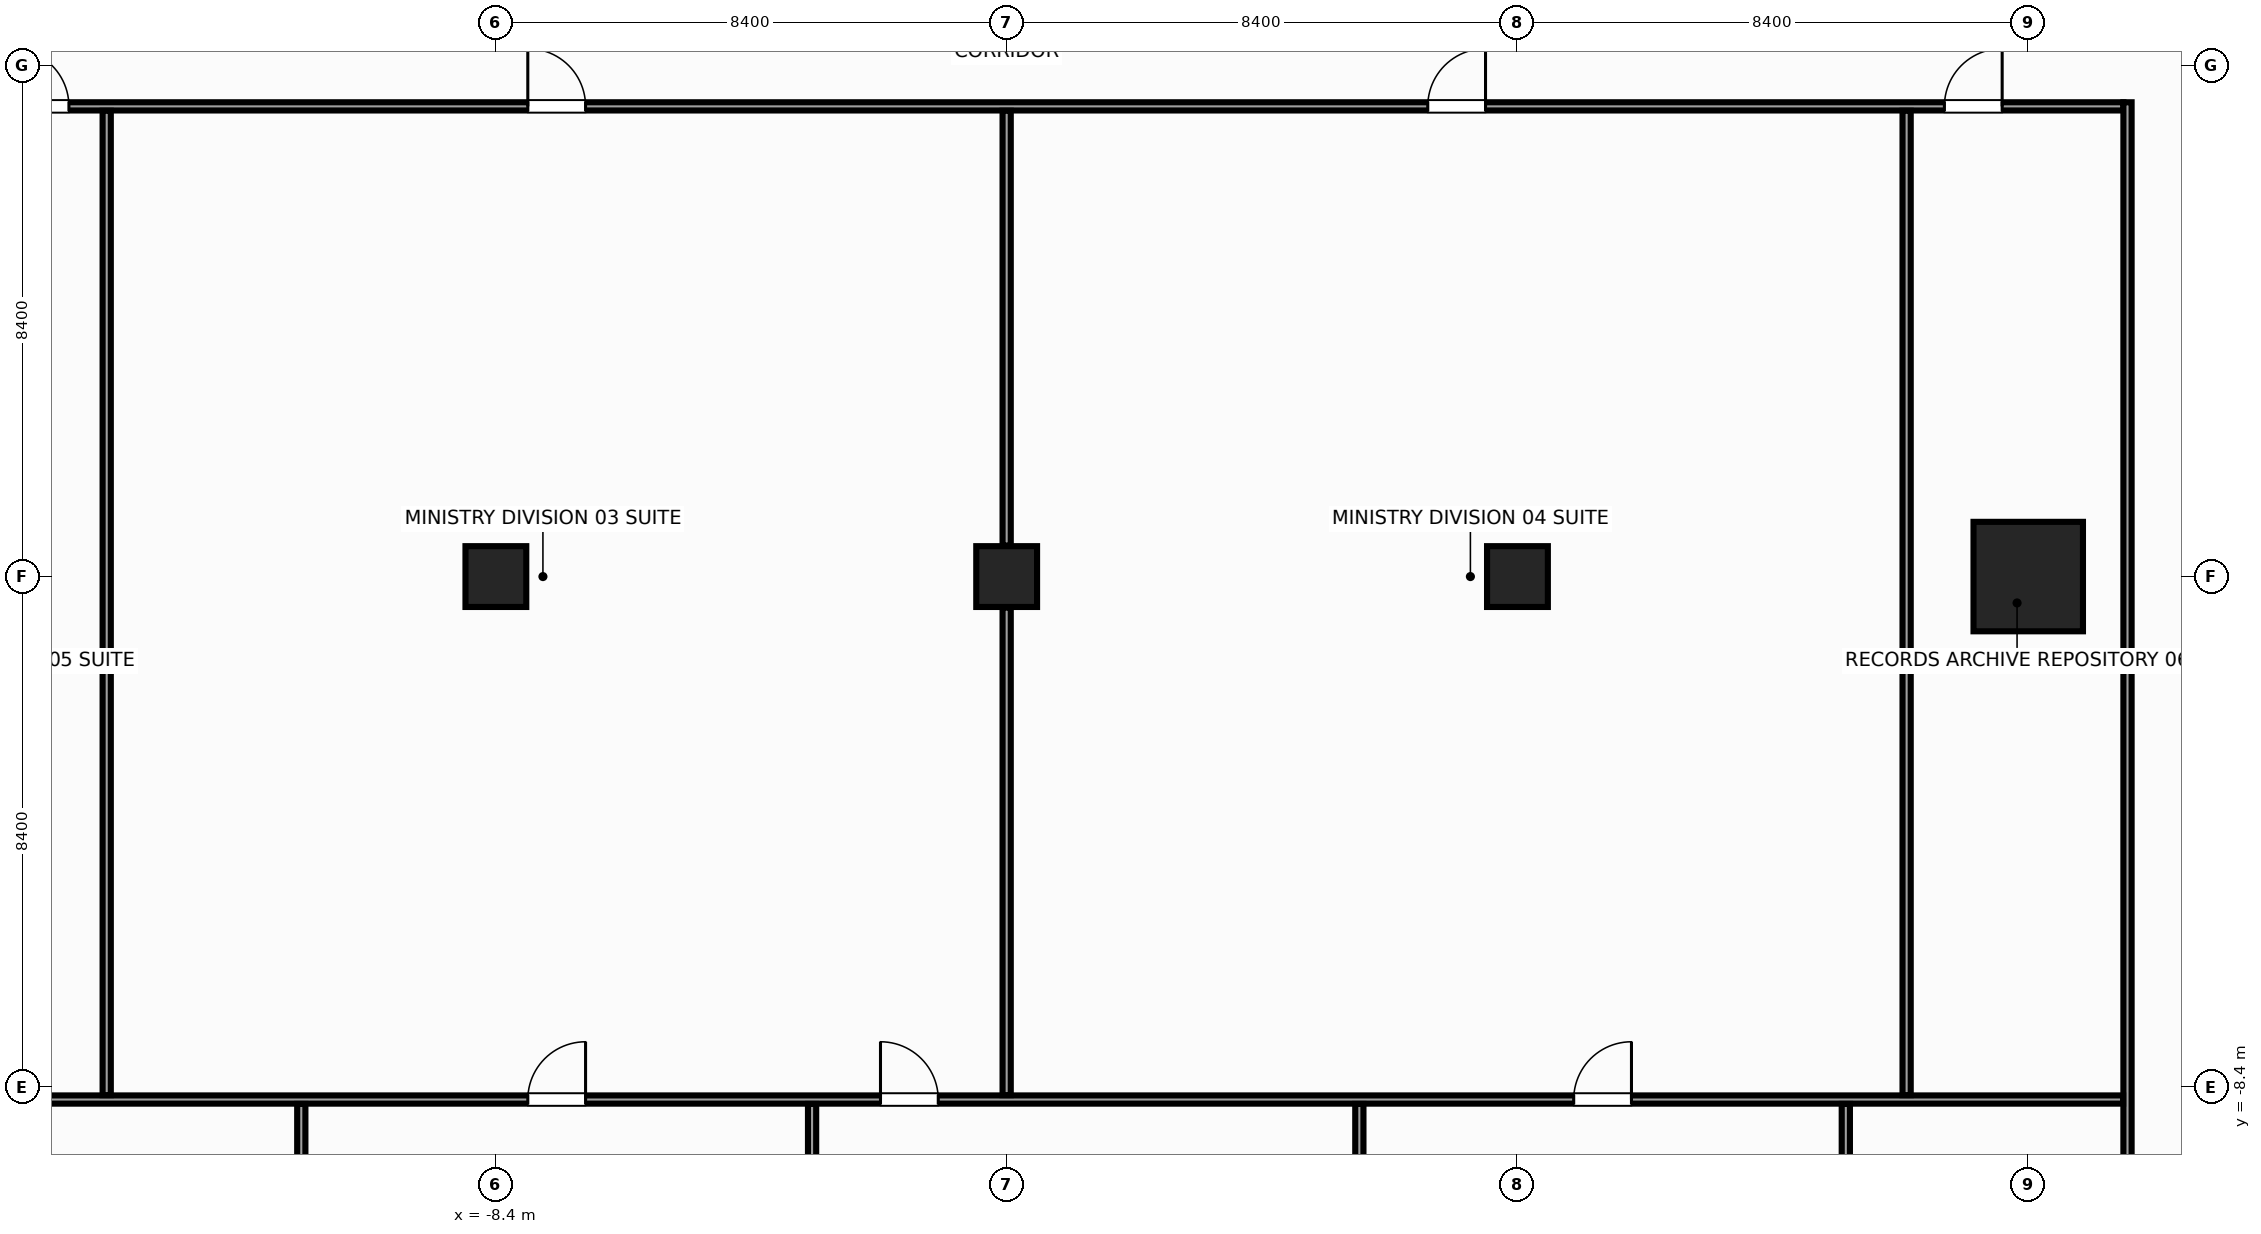
"""IFC4 building model, lengths in metres.
Left out: names, types, materials, properties, quantities, classifications, styles, units other than length and angle.
Written with IfcOpenShell. Run it as: python <this file> out.ifc"""

import sys

from ifc_helpers import new_model, si_unit, direction, frame, frame_2d, origin, origin_with_axes, origin_2d, place, context, subcontext, project, spatial, rectangle, hollow_rectangle, extrude, source, transform, mapped, element, fill, save


model = new_model("IFC4")
c1 = context("Model", 3, precision=1e-05, world=origin(), true_north=direction((0.0, 1.0)))
c2 = subcontext(c1, "Body", "Model", "MODEL_VIEW")
j1 = project(units=[si_unit("LENGTHUNIT", "METRE"), si_unit("PLANEANGLEUNIT", "RADIAN")], contexts=[c1])
p1 = place(None, origin())
s1 = spatial("IfcSite", under=j1, at=p1, CompositionType="ELEMENT")
p2 = place(p1, origin())
s2 = spatial("IfcBuilding", under=s1, at=p2, CompositionType="ELEMENT")
p3 = place(p2, frame((0.0, 0.0, 38.0)))
s3 = spatial("IfcBuildingStorey", under=s2, at=p3, CompositionType="ELEMENT", Elevation=38.0)
m1 = source(origin(), c2, "Body", "SweptSolid", [
    extrude(rectangle(XDim=1.8, YDim=1.8, at=origin_2d()), origin(), (0.0, 0.0, 1.0), 3.6),
])
p4 = place(p3, frame((16.8, 0.0, 0.0), z_axis=(0.0, 0.0, 1.0), x_axis=(1.0, 0.0, 0.0)))
e1 = element("IfcColumn", 1, at=p4, inside=s3, PredefinedType="COLUMN", context=c2, shape_type="MappedRepresentation", body=[
    mapped(m1, transform((0.0, 0.0, 0.0), x_axis=(1.0, 0.0, 0.0), y_axis=(0.0, 1.0, 0.0), z_axis=(0.0, 0.0, 1.0), scale=1.0)),
])
m2 = source(origin(), c2, "Body", "SweptSolid", [
    extrude(hollow_rectangle(XDim=1.0, YDim=1.0, WallThickness=0.045, at=origin_2d()), origin(), (0.0, 0.0, 1.0), 3.6),
])
for number, where, z_axis, x_axis in (
    (2, (-8.4, 0.0, 0.0), (0.0, 0.0, 1.0), (1.0, 0.0, 0.0)),
    (3, (8.4, 0.0, 0.0), (0.0, 0.0, 1.0), (1.0, 0.0, 0.0)),
):
    element("IfcColumn", number, at=place(p3, frame(where, z_axis=z_axis, x_axis=x_axis)), inside=s3, PredefinedType="COLUMN", context=c2, shape_type="MappedRepresentation", body=[
        mapped(m2, transform((0.0, 0.0, 0.0), x_axis=(1.0, 0.0, 0.0), y_axis=(0.0, 1.0, 0.0), z_axis=(0.0, 0.0, 1.0), scale=1.0)),
    ])
m3 = source(origin(), c2, "Body", "SweptSolid", [
    extrude(rectangle(XDim=1.0, YDim=1.0, at=origin_2d()), origin(), (0.0, 0.0, 1.0), 3.6),
])
p5 = place(p3, origin_with_axes())
e4 = element("IfcColumn", 4, at=p5, inside=s3, PredefinedType="COLUMN", context=c2, shape_type="MappedRepresentation", body=[
    mapped(m3, transform((0.0, 0.0, 0.0), x_axis=(1.0, 0.0, 0.0), y_axis=(0.0, 1.0, 0.0), z_axis=(0.0, 0.0, 1.0), scale=1.0)),
])
m4 = source(origin(), c2, "Body", "SweptSolid", [
    extrude(rectangle(XDim=36.73, YDim=0.135, at=frame_2d((18.365, 0.0))), origin(), (0.0, 0.0, 1.0), 2.745),
])
p6 = place(p3, frame((-18.365, 7.732, 0.0), z_axis=(0.0, 0.0, 1.0), x_axis=(1.0, 0.0, 0.0)))
e5 = element("IfcWall", 5, at=p6, inside=s3, PredefinedType="PARTITIONING", context=c2, shape_type="MappedRepresentation", body=[
    mapped(m4, transform((0.0, 0.0, 0.0), x_axis=(1.0, 0.0, 0.0), y_axis=(0.0, 1.0, 0.0), z_axis=(0.0, 0.0, 1.0), scale=1.0)),
])
p7 = place(p6, frame((10.49, 0.0, 0.0)))
e6 = element("IfcOpeningElement", 6, at=p7, cuts=e5, PredefinedType="OPENING", context=c2, shape_type="SweptSolid", body=[
    extrude(rectangle(XDim=0.95, YDim=2.15, at=frame_2d((0.475, 1.075))), frame((0.0, 0.08, 0.0), z_axis=(0.0, -1.0, 0.0), x_axis=(1.0, 0.0, 0.0)), (0.0, 0.0, 1.0), 0.159),
])
p8 = place(p6, frame((25.29, 0.0, 0.0)))
e7 = element("IfcOpeningElement", 7, at=p8, cuts=e5, PredefinedType="OPENING", context=c2, shape_type="SweptSolid", body=[
    extrude(rectangle(XDim=0.95, YDim=2.15, at=frame_2d((0.475, 1.075))), frame((0.0, 0.08, 0.0), z_axis=(0.0, -1.0, 0.0), x_axis=(1.0, 0.0, 0.0)), (0.0, 0.0, 1.0), 0.159),
])
p9 = place(p6, frame((1.994, 0.0, 0.0)))
e8 = element("IfcOpeningElement", 8, at=p9, cuts=e5, PredefinedType="OPENING", context=c2, shape_type="SweptSolid", body=[
    extrude(rectangle(XDim=0.95, YDim=2.15, at=frame_2d((0.475, 1.075))), frame((0.0, 0.08, 0.0), z_axis=(0.0, -1.0, 0.0), x_axis=(1.0, 0.0, 0.0)), (0.0, 0.0, 1.0), 0.159),
])
p10 = place(p6, frame((33.786, 0.0, 0.0)))
e9 = element("IfcOpeningElement", 9, at=p10, cuts=e5, PredefinedType="OPENING", context=c2, shape_type="SweptSolid", body=[
    extrude(rectangle(XDim=0.95, YDim=2.15, at=frame_2d((0.475, 1.075))), frame((0.0, 0.08, 0.0), z_axis=(0.0, -1.0, 0.0), x_axis=(1.0, 0.0, 0.0)), (0.0, 0.0, 1.0), 0.159),
])
m5 = source(origin(), c2, "Body", "SweptSolid", [
    extrude(rectangle(XDim=21.995, YDim=0.135, at=frame_2d((10.998, 0.0))), origin(), (0.0, 0.0, 1.0), 2.745),
])
p11 = place(p3, frame((18.433, -14.195, 0.0), z_axis=(0.0, 0.0, 1.0), x_axis=(0.0, 1.0, 0.0)))
e10 = element("IfcWall", 10, at=p11, inside=s3, PredefinedType="PARTITIONING", context=c2, shape_type="MappedRepresentation", body=[
    mapped(m5, transform((0.0, 0.0, 0.0), x_axis=(1.0, 0.0, 0.0), y_axis=(0.0, 1.0, 0.0), z_axis=(0.0, 0.0, 1.0), scale=1.0)),
])
p12 = place(p11, frame((0.809, 0.0, 0.0)))
e11 = element("IfcOpeningElement", 11, at=p12, cuts=e10, PredefinedType="OPENING", context=c2, shape_type="SweptSolid", body=[
    extrude(rectangle(XDim=0.95, YDim=2.15, at=frame_2d((0.475, 1.075))), frame((0.0, 0.08, 0.0), z_axis=(0.0, -1.0, 0.0), x_axis=(1.0, 0.0, 0.0)), (0.0, 0.0, 1.0), 0.159),
])
m6 = source(origin(), c2, "Body", "SweptSolid", [
    extrude(rectangle(XDim=36.72, YDim=0.135, at=frame_2d((18.36, 0.0))), origin(), (0.0, 0.0, 1.0), 2.745),
])
p13 = place(p3, frame((-18.36, -8.6, 0.0), z_axis=(0.0, 0.0, 1.0), x_axis=(1.0, 0.0, 0.0)))
e12 = element("IfcWall", 12, at=p13, inside=s3, PredefinedType="PARTITIONING", context=c2, shape_type="MappedRepresentation", body=[
    mapped(m6, transform((0.0, 0.0, 0.0), x_axis=(1.0, 0.0, 0.0), y_axis=(0.0, 1.0, 0.0), z_axis=(0.0, 0.0, 1.0), scale=1.0)),
])
p14 = place(p13, frame((10.485, 0.0, 0.0)))
e13 = element("IfcOpeningElement", 13, at=p14, cuts=e12, PredefinedType="OPENING", context=c2, shape_type="SweptSolid", body=[
    extrude(rectangle(XDim=0.95, YDim=2.15, at=frame_2d((0.475, 1.075))), frame((0.0, 0.08, 0.0), z_axis=(0.0, -1.0, 0.0), x_axis=(1.0, 0.0, 0.0)), (0.0, 0.0, 1.0), 0.159),
])
p15 = place(p13, frame((16.285, 0.0, 0.0)))
e14 = element("IfcOpeningElement", 14, at=p15, cuts=e12, PredefinedType="OPENING", context=c2, shape_type="SweptSolid", body=[
    extrude(rectangle(XDim=0.95, YDim=2.15, at=frame_2d((0.475, 1.075))), frame((0.0, 0.08, 0.0), z_axis=(0.0, -1.0, 0.0), x_axis=(1.0, 0.0, 0.0)), (0.0, 0.0, 1.0), 0.159),
])
p16 = place(p13, frame((27.685, 0.0, 0.0)))
e15 = element("IfcOpeningElement", 15, at=p16, cuts=e12, PredefinedType="OPENING", context=c2, shape_type="SweptSolid", body=[
    extrude(rectangle(XDim=0.95, YDim=2.15, at=frame_2d((0.475, 1.075))), frame((0.0, 0.08, 0.0), z_axis=(0.0, -1.0, 0.0), x_axis=(1.0, 0.0, 0.0)), (0.0, 0.0, 1.0), 0.159),
])
m7 = source(origin(), c2, "Body", "SweptSolid", [
    extrude(rectangle(XDim=16.188, YDim=0.135, at=frame_2d((8.094, 0.0))), origin(), (0.0, 0.0, 1.0), 2.37),
])
p17 = place(p3, frame((-14.8, -8.528, 0.0), z_axis=(0.0, 0.0, 1.0), x_axis=(0.0, 1.0, 0.0)))
e16 = element("IfcWall", 16, at=p17, inside=s3, PredefinedType="PARTITIONING", context=c2, shape_type="MappedRepresentation", body=[
    mapped(m7, transform((0.0, 0.0, 0.0), x_axis=(1.0, 0.0, 0.0), y_axis=(0.0, 1.0, 0.0), z_axis=(0.0, 0.0, 1.0), scale=1.0)),
])
m8 = source(origin(), c2, "Body", "SweptSolid", [
    extrude(rectangle(XDim=8.018, YDim=0.135, at=frame_2d((4.009, 0.0))), origin(), (0.0, 0.0, 1.0), 2.745),
])
p18 = place(p3, frame((0.0, -8.528, 0.0), z_axis=(0.0, 0.0, 1.0), x_axis=(0.0, 1.0, 0.0)))
e17 = element("IfcWall", 17, at=p18, inside=s3, PredefinedType="PARTITIONING", context=c2, shape_type="MappedRepresentation", body=[
    mapped(m8, transform((0.0, 0.0, 0.0), x_axis=(1.0, 0.0, 0.0), y_axis=(0.0, 1.0, 0.0), z_axis=(0.0, 0.0, 1.0), scale=1.0)),
])
m9 = source(origin(), c2, "Body", "SweptSolid", [
    extrude(rectangle(XDim=7.15, YDim=0.135, at=frame_2d((3.575, 0.0))), origin(), (0.0, 0.0, 1.0), 2.37),
])
p19 = place(p3, frame((0.0, 0.51, 0.0), z_axis=(0.0, 0.0, 1.0), x_axis=(0.0, 1.0, 0.0)))
e18 = element("IfcWall", 18, at=p19, inside=s3, PredefinedType="PARTITIONING", context=c2, shape_type="MappedRepresentation", body=[
    mapped(m9, transform((0.0, 0.0, 0.0), x_axis=(1.0, 0.0, 0.0), y_axis=(0.0, 1.0, 0.0), z_axis=(0.0, 0.0, 1.0), scale=1.0)),
])
p20 = place(p3, frame((14.8, -8.528, 0.0), z_axis=(0.0, 0.0, 1.0), x_axis=(0.0, 1.0, 0.0)))
e19 = element("IfcWall", 19, at=p20, inside=s3, PredefinedType="PARTITIONING", context=c2, shape_type="MappedRepresentation", body=[
    mapped(m7, transform((0.0, 0.0, 0.0), x_axis=(1.0, 0.0, 0.0), y_axis=(0.0, 1.0, 0.0), z_axis=(0.0, 0.0, 1.0), scale=1.0)),
])
m10 = source(origin(), c2, "Body", "SweptSolid", [
    extrude(rectangle(XDim=18.177, YDim=0.135, at=frame_2d((9.089, 0.0))), origin(), (0.0, 0.0, 1.0), 2.745),
])
for number, where, z_axis, x_axis in (
    (20, (-11.6, -26.85, 0.0), (0.0, 0.0, 1.0), (0.0, 1.0, 0.0)),
    (21, (-3.2, -26.85, 0.0), (0.0, 0.0, 1.0), (0.0, 1.0, 0.0)),
    (22, (5.8, -26.85, 0.0), (0.0, 0.0, 1.0), (0.0, 1.0, 0.0)),
    (23, (13.8, -26.85, 0.0), (0.0, 0.0, 1.0), (0.0, 1.0, 0.0)),
):
    element("IfcWall", number, at=place(p3, frame(where, z_axis=z_axis, x_axis=x_axis)), inside=s3, PredefinedType="PARTITIONING", context=c2, shape_type="MappedRepresentation", body=[
        mapped(m10, transform((0.0, 0.0, 0.0), x_axis=(1.0, 0.0, 0.0), y_axis=(0.0, 1.0, 0.0), z_axis=(0.0, 0.0, 1.0), scale=1.0)),
    ])
m11 = source(origin(), c2, "Body", "SweptSolid", [
    extrude(rectangle(XDim=0.95, YDim=2.15, at=frame_2d((0.475, 1.075))), frame((0.0, 0.025, 0.0), z_axis=(0.0, -1.0, 0.0), x_axis=(1.0, 0.0, 0.0)), (0.0, 0.0, 1.0), 0.05),
])
p21 = place(p7, origin())
e24 = element("IfcDoor", 24, at=p21, inside=s3, OperationType="SINGLE_SWING_LEFT", PredefinedType="DOOR", context=c2, shape_type="MappedRepresentation", body=[
    mapped(m11, transform((0.0, 0.0, 0.0), x_axis=(1.0, 0.0, 0.0), y_axis=(0.0, 1.0, 0.0), z_axis=(0.0, 0.0, 1.0), scale=1.0)),
])
fill(e6, e24)
p22 = place(p8, origin())
e25 = element("IfcDoor", 25, at=p22, inside=s3, OperationType="SINGLE_SWING_RIGHT", PredefinedType="DOOR", context=c2, shape_type="MappedRepresentation", body=[
    mapped(m11, transform((0.0, 0.0, 0.0), x_axis=(1.0, 0.0, 0.0), y_axis=(0.0, 1.0, 0.0), z_axis=(0.0, 0.0, 1.0), scale=1.0)),
])
fill(e7, e25)
p23 = place(p9, origin())
e26 = element("IfcDoor", 26, at=p23, inside=s3, OperationType="SINGLE_SWING_LEFT", PredefinedType="DOOR", context=c2, shape_type="MappedRepresentation", body=[
    mapped(m11, transform((0.0, 0.0, 0.0), x_axis=(1.0, 0.0, 0.0), y_axis=(0.0, 1.0, 0.0), z_axis=(0.0, 0.0, 1.0), scale=1.0)),
])
fill(e8, e26)
p24 = place(p10, origin())
e27 = element("IfcDoor", 27, at=p24, inside=s3, OperationType="SINGLE_SWING_RIGHT", PredefinedType="DOOR", context=c2, shape_type="MappedRepresentation", body=[
    mapped(m11, transform((0.0, 0.0, 0.0), x_axis=(1.0, 0.0, 0.0), y_axis=(0.0, 1.0, 0.0), z_axis=(0.0, 0.0, 1.0), scale=1.0)),
])
fill(e9, e27)
p25 = place(p14, origin())
e28 = element("IfcDoor", 28, at=p25, inside=s3, OperationType="SINGLE_SWING_RIGHT", PredefinedType="DOOR", context=c2, shape_type="MappedRepresentation", body=[
    mapped(m11, transform((0.0, 0.0, 0.0), x_axis=(1.0, 0.0, 0.0), y_axis=(0.0, 1.0, 0.0), z_axis=(0.0, 0.0, 1.0), scale=1.0)),
])
fill(e13, e28)
p26 = place(p15, origin())
e29 = element("IfcDoor", 29, at=p26, inside=s3, OperationType="SINGLE_SWING_LEFT", PredefinedType="DOOR", context=c2, shape_type="MappedRepresentation", body=[
    mapped(m11, transform((0.0, 0.0, 0.0), x_axis=(1.0, 0.0, 0.0), y_axis=(0.0, 1.0, 0.0), z_axis=(0.0, 0.0, 1.0), scale=1.0)),
])
fill(e14, e29)
p27 = place(p16, origin())
e30 = element("IfcDoor", 30, at=p27, inside=s3, OperationType="SINGLE_SWING_RIGHT", PredefinedType="DOOR", context=c2, shape_type="MappedRepresentation", body=[
    mapped(m11, transform((0.0, 0.0, 0.0), x_axis=(1.0, 0.0, 0.0), y_axis=(0.0, 1.0, 0.0), z_axis=(0.0, 0.0, 1.0), scale=1.0)),
])
fill(e15, e30)
save(model, sys.argv[1])
